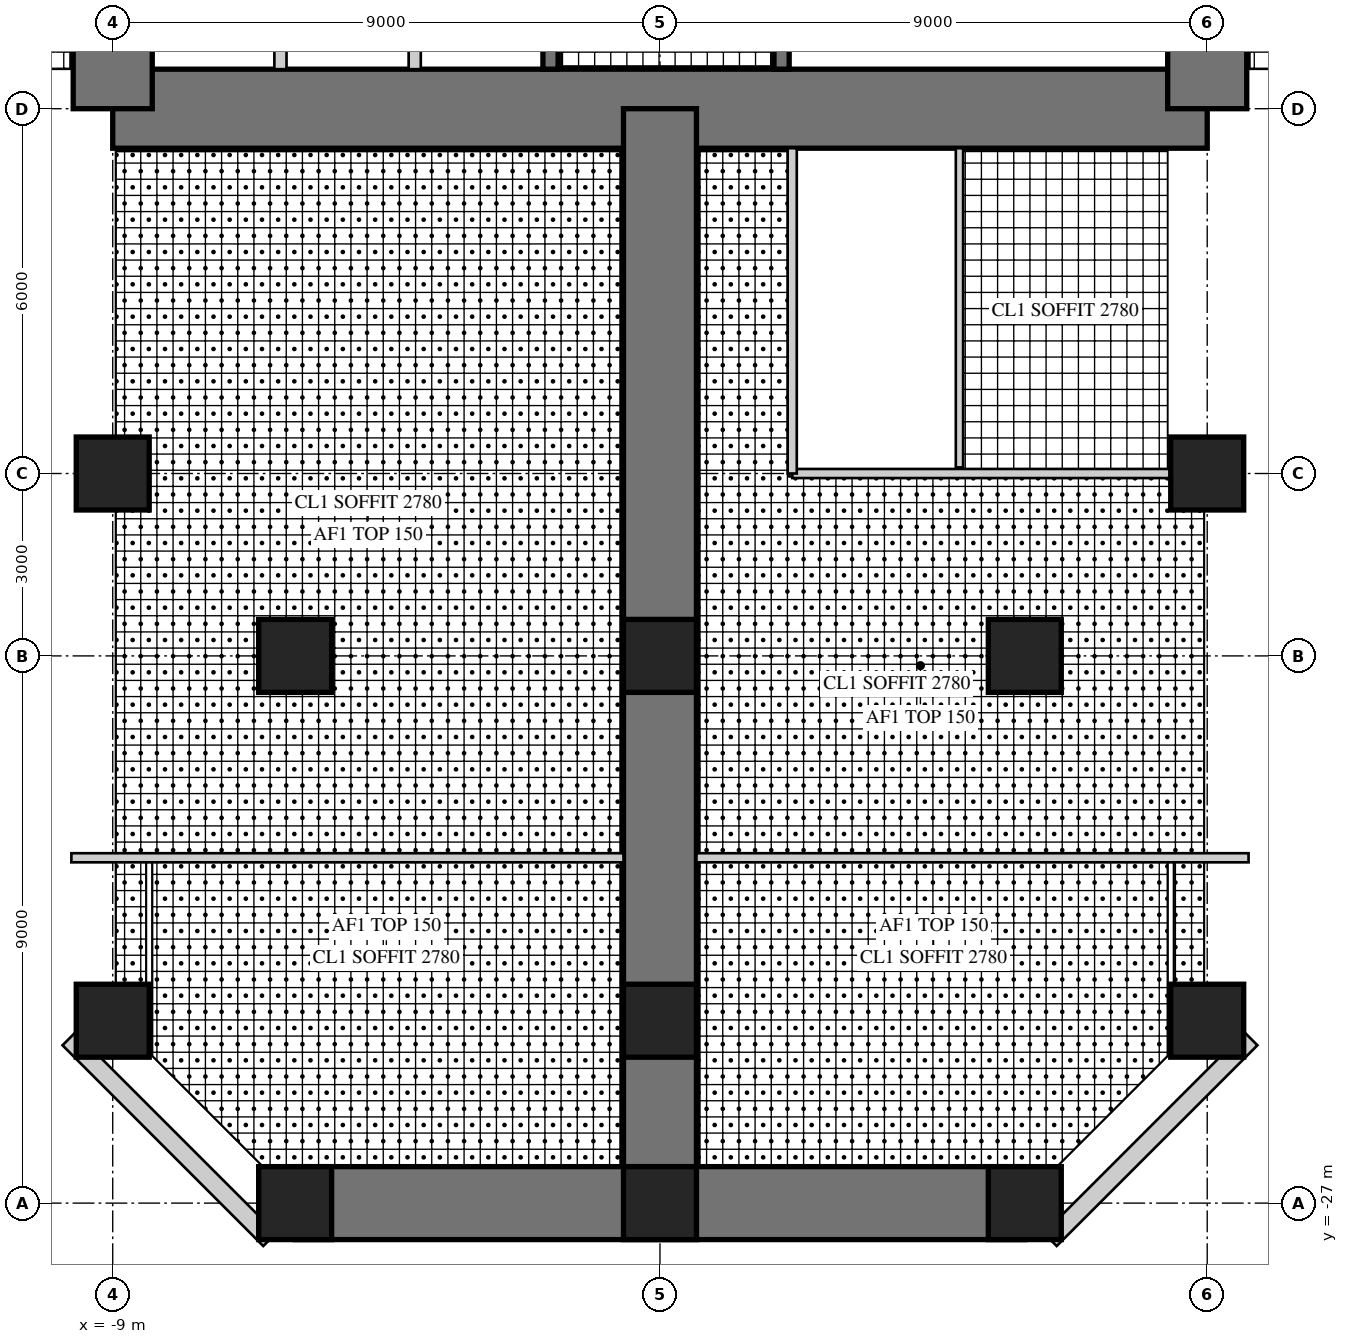
"""IFC4 building model, lengths in metres.
Left out: names, types, materials, properties, quantities, classifications, styles, units other than length and angle.
Written with IfcOpenShell. Run it as: python <this file> out.ifc"""

import sys

from ifc_helpers import new_model, si_unit, direction, frame, frame_2d, origin, origin_2d, place, context, subcontext, project, spatial, rectangle, hollow_rectangle, extrude, element, fill, save


model = new_model("IFC4")
c1 = context("Model", 3, precision=1e-05, world=origin(), true_north=direction((0.0, 1.0)))
c2 = subcontext(c1, "Body", "Model", "MODEL_VIEW")
j1 = project(units=[si_unit("LENGTHUNIT", "METRE"), si_unit("PLANEANGLEUNIT", "RADIAN")], contexts=[c1])
p1 = place(None, origin())
s1 = spatial("IfcSite", under=j1, at=p1, CompositionType="ELEMENT")
p2 = place(p1, origin())
s2 = spatial("IfcBuilding", under=s1, at=p2, CompositionType="ELEMENT")
p3 = place(p2, frame((0.0, 0.0, 79.5)))
s3 = spatial("IfcBuildingStorey", under=s2, at=p3, CompositionType="ELEMENT", Elevation=79.5)
p4 = place(p3, frame((-9.0, -9.0, 0.0), z_axis=(0.0, 0.0, 1.0), x_axis=(1.0, 0.0, 0.0)))
e1 = element("IfcWall", 1, at=p4, inside=s3, PredefinedType="SHEAR", context=c2, shape_type="SweptSolid", body=[
    extrude(rectangle(XDim=18.0, YDim=1.3, at=frame_2d((9.0, 0.0))), origin(), (0.0, 0.0, 1.0), 4.0),
])
p5 = place(p4, frame((9.8, 0.0, 0.0)))
e2 = element("IfcOpeningElement", 2, at=p5, cuts=e1, PredefinedType="OPENING", context=c2, shape_type="SweptSolid", body=[
    extrude(rectangle(XDim=1.0, YDim=2.4, at=frame_2d((0.5, 1.2))), frame((0.0, 0.66, 0.0), z_axis=(0.0, -1.0, 0.0), x_axis=(1.0, 0.0, 0.0)), (0.0, 0.0, 1.0), 1.32),
])
p6 = place(p3, frame((9.0, -9.0, 0.0), z_axis=(0.0, 0.0, 1.0), x_axis=(0.0, 1.0, 0.0)))
e3 = element("IfcWall", 3, at=p6, inside=s3, PredefinedType="SHEAR", context=c2, shape_type="SweptSolid", body=[
    extrude(rectangle(XDim=18.0, YDim=1.3, at=frame_2d((9.0, 0.0))), origin(), (0.0, 0.0, 1.0), 4.0),
])
p7 = place(p6, frame((9.8, 0.0, 0.0)))
e4 = element("IfcOpeningElement", 4, at=p7, cuts=e3, PredefinedType="OPENING", context=c2, shape_type="SweptSolid", body=[
    extrude(rectangle(XDim=1.0, YDim=2.4, at=frame_2d((0.5, 1.2))), frame((0.0, 0.66, 0.0), z_axis=(0.0, -1.0, 0.0), x_axis=(1.0, 0.0, 0.0)), (0.0, 0.0, 1.0), 1.32),
])
p8 = place(p3, frame((-9.0, 9.0, 0.0), z_axis=(0.0, 0.0, 1.0), x_axis=(0.0, -1.0, 0.0)))
e5 = element("IfcWall", 5, at=p8, inside=s3, PredefinedType="SHEAR", context=c2, shape_type="SweptSolid", body=[
    extrude(rectangle(XDim=18.0, YDim=1.3, at=frame_2d((9.0, 0.0))), origin(), (0.0, 0.0, 1.0), 4.0),
])
p9 = place(p8, frame((9.8, 0.0, 0.0)))
e6 = element("IfcOpeningElement", 6, at=p9, cuts=e5, PredefinedType="OPENING", context=c2, shape_type="SweptSolid", body=[
    extrude(rectangle(XDim=1.0, YDim=2.4, at=frame_2d((0.5, 1.2))), frame((0.0, 0.66, 0.0), z_axis=(0.0, -1.0, 0.0), x_axis=(1.0, 0.0, 0.0)), (0.0, 0.0, 1.0), 1.32),
])
p10 = place(p3, frame((-1.8, -1.875, 0.0), z_axis=(0.0, 0.0, 1.0), x_axis=(0.0, -1.0, 0.0)))
e7 = element("IfcWall", 7, at=p10, inside=s3, PredefinedType="SHEAR", context=c2, shape_type="SweptSolid", body=[
    extrude(rectangle(XDim=6.475, YDim=0.25, at=frame_2d((3.238, 0.0))), origin(), (0.0, 0.0, 1.0), 4.0),
])
p11 = place(p10, frame((1.875, 0.0, 0.0)))
e8 = element("IfcOpeningElement", 8, at=p11, cuts=e7, PredefinedType="OPENING", context=c2, shape_type="SweptSolid", body=[
    extrude(rectangle(XDim=1.6, YDim=2.4, at=frame_2d((0.8, 1.2))), frame((0.0, 0.135, 0.0), z_axis=(0.0, -1.0, 0.0), x_axis=(1.0, 0.0, 0.0)), (0.0, 0.0, 1.0), 0.27),
])
for number, where, z_axis, x_axis in (
    (9, (-4.033, -5.975, 0.0), (0.0, 0.0, 1.0), (0.0, -1.0, 0.0)),
    (10, (-6.242, -5.975, 0.0), (0.0, 0.0, 1.0), (0.0, -1.0, 0.0)),
):
    element("IfcWall", number, at=place(p3, frame(where, z_axis=z_axis, x_axis=x_axis)), inside=s3, PredefinedType="PARTITIONING", context=c2, shape_type="SweptSolid", body=[
        extrude(rectangle(XDim=2.375, YDim=0.2, at=frame_2d((1.188, 0.0))), origin(), (0.0, 0.0, 1.0), 4.0),
    ])
p12 = place(p3, frame((2.0, -1.675, 0.0), z_axis=(0.0, 0.0, 1.0), x_axis=(0.0, -1.0, 0.0)))
e11 = element("IfcWall", 11, at=p12, inside=s3, PredefinedType="SHEAR", context=c2, shape_type="SweptSolid", body=[
    extrude(rectangle(XDim=6.675, YDim=0.25, at=frame_2d((3.337, 0.0))), origin(), (0.0, 0.0, 1.0), 4.0),
])
p13 = place(p12, frame((0.725, 0.0, 0.0)))
e12 = element("IfcOpeningElement", 12, at=p13, cuts=e11, PredefinedType="OPENING", context=c2, shape_type="SweptSolid", body=[
    extrude(rectangle(XDim=1.0, YDim=2.1, at=frame_2d((0.5, 1.05))), frame((0.0, 0.135, 0.0), z_axis=(0.0, -1.0, 0.0), x_axis=(1.0, 0.0, 0.0)), (0.0, 0.0, 1.0), 0.27),
])
p14 = place(p3, frame((0.0, -9.0, 0.0), z_axis=(0.0, 0.0, 1.0), x_axis=(0.0, -1.0, 0.0)))
e13 = element("IfcWall", 13, at=p14, inside=s3, PredefinedType="SHEAR", context=c2, shape_type="SweptSolid", body=[
    extrude(rectangle(XDim=18.0, YDim=1.2, at=frame_2d((9.0, 0.0))), origin(), (0.0, 0.0, 1.0), 4.0),
])
p15 = place(p14, frame((9.9, 0.0, 0.0)))
e14 = element("IfcOpeningElement", 14, at=p15, cuts=e13, PredefinedType="OPENING", context=c2, shape_type="SweptSolid", body=[
    extrude(rectangle(XDim=1.0, YDim=2.2, at=frame_2d((0.5, 1.1))), frame((0.0, 0.61, 0.0), z_axis=(0.0, -1.0, 0.0), x_axis=(1.0, 0.0, 0.0)), (0.0, 0.0, 1.0), 1.22),
])
p16 = place(p3, frame((-6.0, -27.0, 0.0), z_axis=(0.0, 0.0, 1.0), x_axis=(1.0, 0.0, 0.0)))
e15 = element("IfcWall", 15, at=p16, inside=s3, PredefinedType="SHEAR", context=c2, shape_type="SweptSolid", body=[
    extrude(rectangle(XDim=12.0, YDim=1.2, at=frame_2d((6.0, 0.0))), origin(), (0.0, 0.0, 1.0), 4.0),
])
p17 = place(p16, frame((1.6, 0.0, 0.6)))
e16 = element("IfcOpeningElement", 16, at=p17, cuts=e15, PredefinedType="OPENING", context=c2, shape_type="SweptSolid", body=[
    extrude(rectangle(XDim=3.0, YDim=2.4, at=frame_2d((1.5, 1.2))), frame((0.0, 0.61, 0.0), z_axis=(0.0, -1.0, 0.0), x_axis=(1.0, 0.0, 0.0)), (0.0, 0.0, 1.0), 1.22),
])
p18 = place(p16, frame((7.4, 0.0, 0.6)))
e17 = element("IfcOpeningElement", 17, at=p18, cuts=e15, PredefinedType="OPENING", context=c2, shape_type="SweptSolid", body=[
    extrude(rectangle(XDim=3.0, YDim=2.4, at=frame_2d((1.5, 1.2))), frame((0.0, 0.61, 0.0), z_axis=(0.0, -1.0, 0.0), x_axis=(1.0, 0.0, 0.0)), (0.0, 0.0, 1.0), 1.22),
])
for number, where, z_axis, x_axis in (
    (18, (-9.0, -15.0, 0.0), (0.0, 0.0, 1.0), (1.0, 0.0, 0.0)),
    (19, (-9.0, -24.0, 0.0), (0.0, 0.0, 1.0), (1.0, 0.0, 0.0)),
    (20, (9.0, -15.0, 0.0), (0.0, 0.0, 1.0), (1.0, 0.0, 0.0)),
    (21, (9.0, -24.0, 0.0), (0.0, 0.0, 1.0), (1.0, 0.0, 0.0)),
    (22, (-6.0, -27.0, 0.0), (0.0, 0.0, 1.0), (1.0, 0.0, 0.0)),
    (23, (0.0, -27.0, 0.0), (0.0, 0.0, 1.0), (1.0, 0.0, 0.0)),
    (24, (6.0, -27.0, 0.0), (0.0, 0.0, 1.0), (1.0, 0.0, 0.0)),
    (25, (-6.0, -18.0, 0.0), (0.0, 0.0, 1.0), (1.0, 0.0, 0.0)),
    (26, (0.0, -18.0, 0.0), (0.0, 0.0, 1.0), (1.0, 0.0, 0.0)),
    (27, (6.0, -18.0, 0.0), (0.0, 0.0, 1.0), (1.0, 0.0, 0.0)),
    (28, (0.0, -24.0, 0.0), (0.0, 0.0, 1.0), (1.0, 0.0, 0.0)),
):
    element("IfcColumn", number, at=place(p3, frame(where, z_axis=z_axis, x_axis=x_axis)), inside=s3, PredefinedType="COLUMN", context=c2, shape_type="SweptSolid", body=[
        extrude(rectangle(XDim=1.2, YDim=1.2, at=origin_2d()), origin(), (0.0, 0.0, 1.0), 4.0),
    ])
p19 = place(p3, frame((-9.72, -24.298, 0.0), z_axis=(0.0, 0.0, 1.0), x_axis=(0.707106781187, -0.707106781187, 0.0)))
e29 = element("IfcWall", 29, at=p19, inside=s3, PredefinedType="SOLIDWALL", context=c2, shape_type="SweptSolid", body=[
    extrude(rectangle(XDim=4.669, YDim=0.3, at=frame_2d((2.335, 0.0))), origin(), (0.0, 0.0, 1.0), 3.8),
])
p20 = place(p19, frame((1.885, 0.0, 0.3)))
e30 = element("IfcOpeningElement", 30, at=p20, cuts=e29, PredefinedType="OPENING", context=c2, shape_type="SweptSolid", body=[
    extrude(rectangle(XDim=0.9, YDim=2.4, at=frame_2d((0.45, 1.2))), frame((0.0, 0.16, 0.0), z_axis=(0.0, -1.0, 0.0), x_axis=(1.0, 0.0, 0.0)), (0.0, 0.0, 1.0), 0.32),
])
p21 = place(p3, frame((6.418, -27.6, 0.0), z_axis=(0.0, 0.0, 1.0), x_axis=(0.707106781187, 0.707106781187, 0.0)))
e31 = element("IfcWall", 31, at=p21, inside=s3, PredefinedType="SOLIDWALL", context=c2, shape_type="SweptSolid", body=[
    extrude(rectangle(XDim=4.669, YDim=0.3, at=frame_2d((2.335, 0.0))), origin(), (0.0, 0.0, 1.0), 3.8),
])
p22 = place(p21, frame((1.885, 0.0, 0.3)))
e32 = element("IfcOpeningElement", 32, at=p22, cuts=e31, PredefinedType="OPENING", context=c2, shape_type="SweptSolid", body=[
    extrude(rectangle(XDim=0.9, YDim=2.4, at=frame_2d((0.45, 1.2))), frame((0.0, 0.16, 0.0), z_axis=(0.0, -1.0, 0.0), x_axis=(1.0, 0.0, 0.0)), (0.0, 0.0, 1.0), 0.32),
])
p23 = place(p3, frame((2.175, -15.0, 0.0), z_axis=(0.0, 0.0, 1.0), x_axis=(1.0, 0.0, 0.0)))
e33 = element("IfcWall", 33, at=p23, inside=s3, PredefinedType="PARTITIONING", context=c2, shape_type="SweptSolid", body=[
    extrude(rectangle(XDim=6.225, YDim=0.15, at=frame_2d((3.112, 0.0))), origin(), (0.0, 0.0, 1.0), 2.95),
])
p24 = place(p23, frame((0.875, 0.0, 0.0)))
e34 = element("IfcOpeningElement", 34, at=p24, cuts=e33, PredefinedType="OPENING", context=c2, shape_type="SweptSolid", body=[
    extrude(rectangle(XDim=1.0, YDim=2.1, at=frame_2d((0.5, 1.05))), frame((0.0, 0.085, 0.0), z_axis=(0.0, -1.0, 0.0), x_axis=(1.0, 0.0, 0.0)), (0.0, 0.0, 1.0), 0.17),
])
p25 = place(p23, frame((3.988, 0.0, 0.0)))
e35 = element("IfcOpeningElement", 35, at=p25, cuts=e33, PredefinedType="OPENING", context=c2, shape_type="SweptSolid", body=[
    extrude(rectangle(XDim=1.0, YDim=2.1, at=frame_2d((0.5, 1.05))), frame((0.0, 0.085, 0.0), z_axis=(0.0, -1.0, 0.0), x_axis=(1.0, 0.0, 0.0)), (0.0, 0.0, 1.0), 0.17),
])
p26 = place(p3, frame((2.175, -9.65, 0.0), z_axis=(0.0, 0.0, 1.0), x_axis=(0.0, -1.0, 0.0)))
e36 = element("IfcWall", 36, at=p26, inside=s3, PredefinedType="PARTITIONING", context=c2, shape_type="SweptSolid", body=[
    extrude(rectangle(XDim=5.35, YDim=0.15, at=frame_2d((2.675, 0.0))), origin(), (0.0, 0.0, 1.0), 3.8),
])
p27 = place(p3, frame((4.926, -9.65, 0.0), z_axis=(0.0, 0.0, 1.0), x_axis=(0.0, -1.0, 0.0)))
e37 = element("IfcWall", 37, at=p27, inside=s3, PredefinedType="PLUMBINGWALL", context=c2, shape_type="SweptSolid", body=[
    extrude(rectangle(XDim=5.25, YDim=0.12, at=frame_2d((2.625, 0.0))), origin(), (0.0, 0.0, 1.0), 3.8),
])
p28 = place(p3, frame((0.6, -21.32, 0.0), z_axis=(0.0, 0.0, 1.0), x_axis=(1.0, 0.0, 0.0)))
e38 = element("IfcWall", 38, at=p28, inside=s3, PredefinedType="PARTITIONING", context=c2, shape_type="SweptSolid", body=[
    extrude(rectangle(XDim=9.08, YDim=0.15, at=frame_2d((4.54, 0.0))), origin(), (0.0, 0.0, 1.0), 3.8),
])
p29 = place(p28, frame((0.45, 0.0, 0.0)))
e39 = element("IfcOpeningElement", 39, at=p29, cuts=e38, PredefinedType="OPENING", context=c2, shape_type="SweptSolid", body=[
    extrude(rectangle(XDim=1.0, YDim=2.2, at=frame_2d((0.5, 1.1))), frame((0.0, 0.085, 0.0), z_axis=(0.0, -1.0, 0.0), x_axis=(1.0, 0.0, 0.0)), (0.0, 0.0, 1.0), 0.17),
])
p30 = place(p3, frame((-9.68, -21.32, 0.0), z_axis=(0.0, 0.0, 1.0), x_axis=(1.0, 0.0, 0.0)))
e40 = element("IfcWall", 40, at=p30, inside=s3, PredefinedType="PARTITIONING", context=c2, shape_type="SweptSolid", body=[
    extrude(rectangle(XDim=9.08, YDim=0.15, at=frame_2d((4.54, 0.0))), origin(), (0.0, 0.0, 1.0), 3.8),
])
p31 = place(p30, frame((7.63, 0.0, 0.0)))
e41 = element("IfcOpeningElement", 41, at=p31, cuts=e40, PredefinedType="OPENING", context=c2, shape_type="SweptSolid", body=[
    extrude(rectangle(XDim=1.0, YDim=2.2, at=frame_2d((0.5, 1.1))), frame((0.0, 0.085, 0.0), z_axis=(0.0, -1.0, 0.0), x_axis=(1.0, 0.0, 0.0)), (0.0, 0.0, 1.0), 0.17),
])
p32 = place(p20, origin())
e42 = element("IfcWindow", 42, at=p32, inside=s3, PartitioningType="SINGLE_PANEL", PredefinedType="WINDOW", context=c2, shape_type="SweptSolid", body=[
    extrude(hollow_rectangle(XDim=0.9, YDim=2.4, WallThickness=0.06, at=frame_2d((0.45, 1.2))), frame((0.0, 0.03, 0.0), z_axis=(0.0, -1.0, 0.0), x_axis=(1.0, 0.0, 0.0)), (0.0, 0.0, 1.0), 0.06),
    extrude(rectangle(XDim=0.779, YDim=2.279, at=frame_2d((0.45, 1.2))), frame((0.0, 0.03, 0.0), z_axis=(0.0, -1.0, 0.0), x_axis=(1.0, 0.0, 0.0)), (0.0, 0.0, 1.0), 0.06),
])
fill(e30, e42)
p33 = place(p17, origin())
e43 = element("IfcWindow", 43, at=p33, inside=s3, PartitioningType="SINGLE_PANEL", PredefinedType="WINDOW", context=c2, shape_type="SweptSolid", body=[
    extrude(hollow_rectangle(XDim=3.0, YDim=2.4, WallThickness=0.06, at=frame_2d((1.5, 1.2))), frame((0.0, 0.03, 0.0), z_axis=(0.0, -1.0, 0.0), x_axis=(1.0, 0.0, 0.0)), (0.0, 0.0, 1.0), 0.06),
    extrude(rectangle(XDim=2.879, YDim=2.279, at=frame_2d((1.5, 1.2))), frame((0.0, 0.03, 0.0), z_axis=(0.0, -1.0, 0.0), x_axis=(1.0, 0.0, 0.0)), (0.0, 0.0, 1.0), 0.06),
])
fill(e16, e43)
p34 = place(p18, origin())
e44 = element("IfcWindow", 44, at=p34, inside=s3, PartitioningType="SINGLE_PANEL", PredefinedType="WINDOW", context=c2, shape_type="SweptSolid", body=[
    extrude(hollow_rectangle(XDim=3.0, YDim=2.4, WallThickness=0.06, at=frame_2d((1.5, 1.2))), frame((0.0, 0.03, 0.0), z_axis=(0.0, -1.0, 0.0), x_axis=(1.0, 0.0, 0.0)), (0.0, 0.0, 1.0), 0.06),
    extrude(rectangle(XDim=2.879, YDim=2.279, at=frame_2d((1.5, 1.2))), frame((0.0, 0.03, 0.0), z_axis=(0.0, -1.0, 0.0), x_axis=(1.0, 0.0, 0.0)), (0.0, 0.0, 1.0), 0.06),
])
fill(e17, e44)
p35 = place(p22, origin())
e45 = element("IfcWindow", 45, at=p35, inside=s3, PartitioningType="SINGLE_PANEL", PredefinedType="WINDOW", context=c2, shape_type="SweptSolid", body=[
    extrude(hollow_rectangle(XDim=0.9, YDim=2.4, WallThickness=0.06, at=frame_2d((0.45, 1.2))), frame((0.0, 0.03, 0.0), z_axis=(0.0, -1.0, 0.0), x_axis=(1.0, 0.0, 0.0)), (0.0, 0.0, 1.0), 0.06),
    extrude(rectangle(XDim=0.779, YDim=2.279, at=frame_2d((0.45, 1.2))), frame((0.0, 0.03, 0.0), z_axis=(0.0, -1.0, 0.0), x_axis=(1.0, 0.0, 0.0)), (0.0, 0.0, 1.0), 0.06),
])
fill(e32, e45)
p36 = place(p24, origin())
e46 = element("IfcDoor", 46, at=p36, inside=s3, OperationType="SINGLE_SWING_LEFT", PredefinedType="DOOR", context=c2, shape_type="SweptSolid", body=[
    extrude(rectangle(XDim=1.0, YDim=2.1, at=frame_2d((0.5, 1.05))), frame((0.0, 0.025, 0.0), z_axis=(0.0, -1.0, 0.0), x_axis=(1.0, 0.0, 0.0)), (0.0, 0.0, 1.0), 0.05),
])
fill(e34, e46)
p37 = place(p25, origin())
e47 = element("IfcDoor", 47, at=p37, inside=s3, OperationType="SINGLE_SWING_LEFT", PredefinedType="DOOR", context=c2, shape_type="SweptSolid", body=[
    extrude(rectangle(XDim=1.0, YDim=2.1, at=frame_2d((0.5, 1.05))), frame((0.0, 0.025, 0.0), z_axis=(0.0, -1.0, 0.0), x_axis=(1.0, 0.0, 0.0)), (0.0, 0.0, 1.0), 0.05),
])
fill(e35, e47)
p38 = place(p29, frame((1.0, 0.0, 0.0), z_axis=(0.0, 0.0, 1.0), x_axis=(-1.0, 0.0, 0.0)))
e48 = element("IfcDoor", 48, at=p38, inside=s3, OperationType="SINGLE_SWING_RIGHT", PredefinedType="DOOR", context=c2, shape_type="SweptSolid", body=[
    extrude(rectangle(XDim=1.0, YDim=2.2, at=frame_2d((0.5, 1.1))), frame((0.0, 0.025, 0.0), z_axis=(0.0, -1.0, 0.0), x_axis=(1.0, 0.0, 0.0)), (0.0, 0.0, 1.0), 0.05),
])
fill(e39, e48)
p39 = place(p31, frame((1.0, 0.0, 0.0), z_axis=(0.0, 0.0, 1.0), x_axis=(-1.0, 0.0, 0.0)))
e49 = element("IfcDoor", 49, at=p39, inside=s3, OperationType="SINGLE_SWING_LEFT", PredefinedType="DOOR", context=c2, shape_type="SweptSolid", body=[
    extrude(rectangle(XDim=1.0, YDim=2.2, at=frame_2d((0.5, 1.1))), frame((0.0, 0.025, 0.0), z_axis=(0.0, -1.0, 0.0), x_axis=(1.0, 0.0, 0.0)), (0.0, 0.0, 1.0), 0.05),
])
fill(e41, e49)
p40 = place(p15, origin())
e50 = element("IfcDoor", 50, at=p40, inside=s3, OperationType="SINGLE_SWING_RIGHT", PredefinedType="DOOR", context=c2, shape_type="SweptSolid", body=[
    extrude(rectangle(XDim=1.0, YDim=2.2, at=frame_2d((0.5, 1.1))), frame((0.0, 0.025, 0.0), z_axis=(0.0, -1.0, 0.0), x_axis=(1.0, 0.0, 0.0)), (0.0, 0.0, 1.0), 0.05),
])
fill(e14, e50)
p41 = place(p5, frame((1.0, 0.0, 0.0), z_axis=(0.0, 0.0, 1.0), x_axis=(-1.0, 0.0, 0.0)))
e51 = element("IfcDoor", 51, at=p41, inside=s3, OperationType="SINGLE_SWING_RIGHT", PredefinedType="DOOR", context=c2, shape_type="SweptSolid", body=[
    extrude(rectangle(XDim=1.0, YDim=2.4, at=frame_2d((0.5, 1.2))), frame((0.0, -0.005, 0.0), z_axis=(0.0, -1.0, 0.0), x_axis=(1.0, 0.0, 0.0)), (0.0, 0.0, 1.0), 0.05),
])
fill(e2, e51)
save(model, sys.argv[1])
